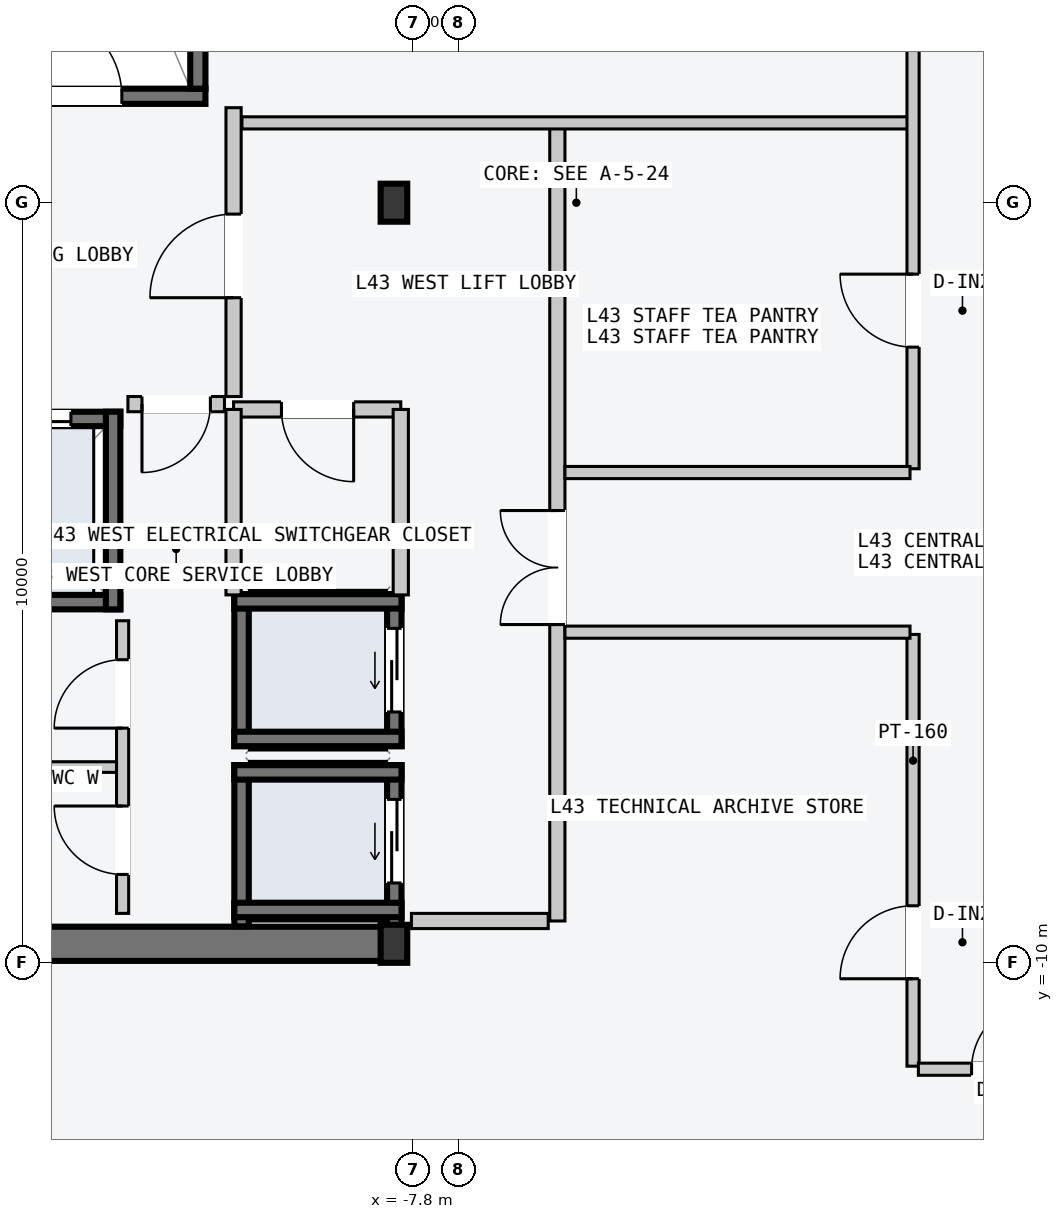
"""IFC4 building model, lengths in metres.
Left out: names, types, materials, properties, quantities, classifications, styles, units other than length and angle.
Written with IfcOpenShell. Run it as: python <this file> out.ifc"""

import sys

from ifc_helpers import new_model, si_unit, direction, frame, frame_2d, origin, origin_2d, place, context, subcontext, project, spatial, rectangle, i_section, extrude, element, fill, save


model = new_model("IFC4")
c1 = context("Model", 3, precision=1e-05, world=origin(), true_north=direction((0.0, 1.0)))
c2 = subcontext(c1, "Body", "Model", "MODEL_VIEW")
j1 = project(units=[si_unit("LENGTHUNIT", "METRE"), si_unit("PLANEANGLEUNIT", "RADIAN")], contexts=[c1])
p1 = place(None, origin())
s1 = spatial("IfcSite", under=j1, at=p1, CompositionType="ELEMENT")
p2 = place(p1, origin())
s2 = spatial("IfcBuilding", under=s1, at=p2, CompositionType="ELEMENT")
p3 = place(p2, frame((0.0, 0.0, 165.9)))
s3 = spatial("IfcBuildingStorey", under=s2, at=p3, CompositionType="ELEMENT", Elevation=165.9)
p4 = place(p3, frame((-14.53, -9.75, -0.2), z_axis=(0.0, 0.0, 1.0), x_axis=(1.0, 0.0, 0.0)))
e1 = element("IfcWall", 1, at=p4, inside=s3, PredefinedType="SHEAR", context=c2, shape_type="SweptSolid", body=[
    extrude(rectangle(XDim=6.46, YDim=0.45, at=frame_2d((3.23, 0.0))), origin(), (0.0, 0.0, 1.0), 3.6),
])
p5 = place(p3, frame((-14.25, 1.4, -0.2), z_axis=(0.0, 0.0, 1.0), x_axis=(1.0, 0.0, 0.0)))
e2 = element("IfcWall", 2, at=p5, inside=s3, PredefinedType="SOLIDWALL", context=c2, shape_type="SweptSolid", body=[
    extrude(rectangle(XDim=3.72, YDim=0.2, at=frame_2d((1.86, 0.0))), origin(), (0.0, 0.0, 1.0), 3.6),
])
p6 = place(p5, frame((1.5, 0.0, 0.2)))
e3 = element("IfcOpeningElement", 3, at=p6, cuts=e2, PredefinedType="OPENING", context=c2, shape_type="SweptSolid", body=[
    extrude(rectangle(XDim=1.12, YDim=2.18, at=frame_2d((0.56, 1.09))), frame((0.0, 0.11, 0.0), z_axis=(0.0, -1.0, 0.0), x_axis=(1.0, 0.0, 0.0)), (0.0, 0.0, 1.0), 0.22),
])
p7 = place(p3, frame((-10.63, 1.5, -0.2), z_axis=(0.0, 0.0, 1.0), x_axis=(0.0, 1.0, 0.0)))
e4 = element("IfcWall", 4, at=p7, inside=s3, PredefinedType="SOLIDWALL", context=c2, shape_type="SweptSolid", body=[
    extrude(rectangle(XDim=7.8, YDim=0.2, at=frame_2d((3.9, 0.0))), origin(), (0.0, 0.0, 1.0), 3.6),
])
for number, where, z_axis, x_axis in (
    (5, (-8.05, -9.75, 0.0), (0.0, 0.0, 1.0), (1.0, 0.0, 0.0)),
    (6, (-8.05, 0.0, 0.0), (0.0, 0.0, 1.0), (1.0, 0.0, 0.0)),
):
    element("IfcColumn", number, at=place(p3, frame(where, z_axis=z_axis, x_axis=x_axis)), inside=s3, PredefinedType="COLUMN", context=c2, shape_type="SweptSolid", body=[
        extrude(i_section(OverallWidth=0.35, OverallDepth=0.5, WebThickness=0.02, FlangeThickness=0.032, at=origin_2d()), origin(), (0.0, 0.0, 1.0), 3.6),
    ])
p8 = place(p3, frame((-8.045, -9.52, -0.2), z_axis=(0.0, 0.0, 1.0), x_axis=(0.0, 1.0, 0.0)))
e7 = element("IfcWall", 7, at=p8, inside=s3, PredefinedType="SOLIDWALL", context=c2, shape_type="SweptSolid", body=[
    extrude(rectangle(XDim=2.12, YDim=0.19, at=frame_2d((1.06, 0.0))), origin(), (0.0, 0.0, 1.0), 3.6),
])
p9 = place(p8, frame((0.57, 0.0, 0.2)))
e8 = element("IfcOpeningElement", 8, at=p9, cuts=e7, PredefinedType="OPENING", context=c2, shape_type="SweptSolid", body=[
    extrude(rectangle(XDim=1.1, YDim=2.2, at=frame_2d((0.55, 1.1))), frame((0.0, 0.105, 0.0), z_axis=(0.0, -1.0, 0.0), x_axis=(1.0, 0.0, 0.0)), (0.0, 0.0, 1.0), 0.21),
])
p10 = place(p3, frame((-10.055, -9.52, -0.2), z_axis=(0.0, 0.0, 1.0), x_axis=(0.0, 1.0, 0.0)))
e9 = element("IfcWall", 9, at=p10, inside=s3, PredefinedType="SOLIDWALL", context=c2, shape_type="SweptSolid", body=[
    extrude(rectangle(XDim=2.12, YDim=0.19, at=frame_2d((1.06, 0.0))), origin(), (0.0, 0.0, 1.0), 3.6),
])
for number, where, z_axis, x_axis in (
    (10, (-10.15, -7.495, -0.2), (0.0, 0.0, 1.0), (1.0, 0.0, 0.0)),
    (11, (-10.15, -9.305, -0.2), (0.0, 0.0, 1.0), (1.0, 0.0, 0.0)),
):
    element("IfcWall", number, at=place(p3, frame(where, z_axis=z_axis, x_axis=x_axis)), inside=s3, PredefinedType="SOLIDWALL", context=c2, shape_type="SweptSolid", body=[
        extrude(rectangle(XDim=2.2, YDim=0.19, at=frame_2d((1.1, 0.0))), origin(), (0.0, 0.0, 1.0), 3.6),
    ])
p11 = place(p3, frame((-8.045, -7.15, -0.2), z_axis=(0.0, 0.0, 1.0), x_axis=(0.0, 1.0, 0.0)))
e12 = element("IfcWall", 12, at=p11, inside=s3, PredefinedType="SOLIDWALL", context=c2, shape_type="SweptSolid", body=[
    extrude(rectangle(XDim=2.0, YDim=0.19, at=frame_2d((1.0, 0.0))), origin(), (0.0, 0.0, 1.0), 3.6),
])
p12 = place(p11, frame((0.45, 0.0, 0.2)))
e13 = element("IfcOpeningElement", 13, at=p12, cuts=e12, PredefinedType="OPENING", context=c2, shape_type="SweptSolid", body=[
    extrude(rectangle(XDim=1.1, YDim=2.2, at=frame_2d((0.55, 1.1))), frame((0.0, 0.105, 0.0), z_axis=(0.0, -1.0, 0.0), x_axis=(1.0, 0.0, 0.0)), (0.0, 0.0, 1.0), 0.21),
])
p13 = place(p3, frame((-10.055, -7.15, -0.2), z_axis=(0.0, 0.0, 1.0), x_axis=(0.0, 1.0, 0.0)))
e14 = element("IfcWall", 14, at=p13, inside=s3, PredefinedType="SOLIDWALL", context=c2, shape_type="SweptSolid", body=[
    extrude(rectangle(XDim=2.0, YDim=0.19, at=frame_2d((1.0, 0.0))), origin(), (0.0, 0.0, 1.0), 3.6),
])
for number, where, z_axis, x_axis in (
    (15, (-10.15, -5.245, -0.2), (0.0, 0.0, 1.0), (1.0, 0.0, 0.0)),
    (16, (-10.15, -7.055, -0.2), (0.0, 0.0, 1.0), (1.0, 0.0, 0.0)),
):
    element("IfcWall", number, at=place(p3, frame(where, z_axis=z_axis, x_axis=x_axis)), inside=s3, PredefinedType="SOLIDWALL", context=c2, shape_type="SweptSolid", body=[
        extrude(rectangle(XDim=2.2, YDim=0.19, at=frame_2d((1.1, 0.0))), origin(), (0.0, 0.0, 1.0), 3.6),
    ])
p14 = place(p3, frame((-14.33, -2.845, -0.2), z_axis=(0.0, 0.0, 1.0), x_axis=(1.0, 0.0, 0.0)))
e17 = element("IfcWall", 17, at=p14, inside=s3, PredefinedType="SOLIDWALL", context=c2, shape_type="SweptSolid", body=[
    extrude(rectangle(XDim=2.68, YDim=0.19, at=frame_2d((1.34, 0.0))), origin(), (0.0, 0.0, 1.0), 3.6),
])
p15 = place(p14, frame((0.83, 0.0, 0.2)))
e18 = element("IfcOpeningElement", 18, at=p15, cuts=e17, PredefinedType="OPENING", context=c2, shape_type="SweptSolid", body=[
    extrude(rectangle(XDim=1.2, YDim=2.2, at=frame_2d((0.6, 1.1))), frame((0.0, 0.105, 0.0), z_axis=(0.0, -1.0, 0.0), x_axis=(1.0, 0.0, 0.0)), (0.0, 0.0, 1.0), 0.21),
])
p16 = place(p3, frame((-14.33, -5.255, -0.2), z_axis=(0.0, 0.0, 1.0), x_axis=(1.0, 0.0, 0.0)))
e19 = element("IfcWall", 19, at=p16, inside=s3, PredefinedType="SOLIDWALL", context=c2, shape_type="SweptSolid", body=[
    extrude(rectangle(XDim=2.68, YDim=0.19, at=frame_2d((1.34, 0.0))), origin(), (0.0, 0.0, 1.0), 3.6),
])
p17 = place(p3, frame((-11.745, -5.35, -0.2), z_axis=(0.0, 0.0, 1.0), x_axis=(0.0, 1.0, 0.0)))
e20 = element("IfcWall", 20, at=p17, inside=s3, PredefinedType="SOLIDWALL", context=c2, shape_type="SweptSolid", body=[
    extrude(rectangle(XDim=2.6, YDim=0.19, at=frame_2d((1.3, 0.0))), origin(), (0.0, 0.0, 1.0), 3.6),
])
p18 = place(p3, frame((-5.9, -9.45, 0.0), z_axis=(0.0, 0.0, 1.0), x_axis=(0.0, 1.0, 0.0)))
e21 = element("IfcWall", 21, at=p18, inside=s3, PredefinedType="PARTITIONING", context=c2, shape_type="SweptSolid", body=[
    extrude(rectangle(XDim=10.5, YDim=0.2, at=frame_2d((5.25, 0.0))), origin(), (0.0, 0.0, 1.0), 3.4),
])
p19 = place(p18, frame((3.9, 0.0, 0.0)))
e22 = element("IfcOpeningElement", 22, at=p19, cuts=e21, PredefinedType="OPENING", context=c2, shape_type="SweptSolid", body=[
    extrude(rectangle(XDim=1.5, YDim=2.2, at=frame_2d((0.75, 1.1))), frame((0.0, 0.11, 0.0), z_axis=(0.0, -1.0, 0.0), x_axis=(1.0, 0.0, 0.0)), (0.0, 0.0, 1.0), 0.22),
])
p20 = place(p3, frame((-6.02, -9.45, 0.0), z_axis=(0.0, 0.0, 1.0), x_axis=(-1.0, 0.0, 0.0)))
e23 = element("IfcWall", 23, at=p20, inside=s3, PredefinedType="PARTITIONING", context=c2, shape_type="SweptSolid", body=[
    extrude(rectangle(XDim=1.8, YDim=0.2, at=frame_2d((0.9, 0.0))), origin(), (0.0, 0.0, 1.0), 3.4),
])
p21 = place(p3, frame((-10.16, -2.55, 0.0), z_axis=(0.0, 0.0, 1.0), x_axis=(0.0, 1.0, 0.0)))
e24 = element("IfcWall", 24, at=p21, inside=s3, PredefinedType="PARTITIONING", context=c2, shape_type="SweptSolid", body=[
    extrude(rectangle(XDim=3.8, YDim=0.2, at=frame_2d((1.9, 0.0))), origin(), (0.0, 0.0, 1.0), 3.4),
])
p22 = place(p21, frame((1.3, 0.0, 0.0)))
e25 = element("IfcOpeningElement", 25, at=p22, cuts=e24, PredefinedType="OPENING", context=c2, shape_type="SweptSolid", body=[
    extrude(rectangle(XDim=1.1, YDim=2.15, at=frame_2d((0.55, 1.075))), frame((0.0, 0.11, 0.0), z_axis=(0.0, -1.0, 0.0), x_axis=(1.0, 0.0, 0.0)), (0.0, 0.0, 1.0), 0.22),
])
p23 = place(p3, frame((-10.28, -2.65, 0.0), z_axis=(0.0, 0.0, 1.0), x_axis=(-1.0, 0.0, 0.0)))
e26 = element("IfcWall", 26, at=p23, inside=s3, PredefinedType="PARTITIONING", context=c2, shape_type="SweptSolid", body=[
    extrude(rectangle(XDim=1.27, YDim=0.2, at=frame_2d((0.635, 0.0))), origin(), (0.0, 0.0, 1.0), 3.4),
])
p24 = place(p23, frame((0.185, 0.0, 0.0)))
e27 = element("IfcOpeningElement", 27, at=p24, cuts=e26, PredefinedType="OPENING", context=c2, shape_type="SweptSolid", body=[
    extrude(rectangle(XDim=0.9, YDim=2.15, at=frame_2d((0.45, 1.075))), frame((0.0, 0.11, 0.0), z_axis=(0.0, -1.0, 0.0), x_axis=(1.0, 0.0, 0.0)), (0.0, 0.0, 1.0), 0.22),
])
p25 = place(p3, frame((-7.96, -2.72, 0.0), z_axis=(0.0, 0.0, 1.0), x_axis=(-1.0, 0.0, 0.0)))
e28 = element("IfcWall", 28, at=p25, inside=s3, PredefinedType="PARTITIONING", context=c2, shape_type="SweptSolid", body=[
    extrude(rectangle(XDim=2.2, YDim=0.2, at=frame_2d((1.1, 0.0))), origin(), (0.0, 0.0, 1.0), 3.4),
])
p26 = place(p25, frame((0.62, 0.0, 0.0)))
e29 = element("IfcOpeningElement", 29, at=p26, cuts=e28, PredefinedType="OPENING", context=c2, shape_type="SweptSolid", body=[
    extrude(rectangle(XDim=0.95, YDim=2.1, at=frame_2d((0.475, 1.05))), frame((0.0, 0.11, 0.0), z_axis=(0.0, -1.0, 0.0), x_axis=(1.0, 0.0, 0.0)), (0.0, 0.0, 1.0), 0.22),
])
for number, where, z_axis, x_axis in (
    (30, (-7.96, -5.16, 0.0), (0.0, 0.0, 1.0), (0.0, 1.0, 0.0)),
    (31, (-10.16, -5.16, 0.0), (0.0, 0.0, 1.0), (0.0, 1.0, 0.0)),
):
    element("IfcWall", number, at=place(p3, frame(where, z_axis=z_axis, x_axis=x_axis)), inside=s3, PredefinedType="PARTITIONING", context=c2, shape_type="SweptSolid", body=[
        extrude(rectangle(XDim=2.44, YDim=0.2, at=frame_2d((1.22, 0.0))), origin(), (0.0, 0.0, 1.0), 3.4),
    ])
p27 = place(p3, frame((-11.7, -7.425, 0.0), z_axis=(0.0, 0.0, 1.0), x_axis=(-1.0, 0.0, 0.0)))
e32 = element("IfcWall", 32, at=p27, inside=s3, PredefinedType="PARTITIONING", context=c2, shape_type="SweptSolid", body=[
    extrude(rectangle(XDim=2.5, YDim=0.14, at=frame_2d((1.25, 0.0))), origin(), (0.0, 0.0, 1.0), 3.4),
])
p28 = place(p3, frame((-11.62, -9.35, 0.0), z_axis=(0.0, 0.0, 1.0), x_axis=(0.0, 1.0, 0.0)))
e33 = element("IfcWall", 33, at=p28, inside=s3, PredefinedType="PARTITIONING", context=c2, shape_type="SweptSolid", body=[
    extrude(rectangle(XDim=3.85, YDim=0.16, at=frame_2d((1.925, 0.0))), origin(), (0.0, 0.0, 1.0), 3.4),
])
p29 = place(p28, frame((0.512, 0.0, 0.0)))
e34 = element("IfcOpeningElement", 34, at=p29, cuts=e33, PredefinedType="OPENING", context=c2, shape_type="SweptSolid", body=[
    extrude(rectangle(XDim=0.9, YDim=2.15, at=frame_2d((0.45, 1.075))), frame((0.0, 0.09, 0.0), z_axis=(0.0, -1.0, 0.0), x_axis=(1.0, 0.0, 0.0)), (0.0, 0.0, 1.0), 0.18),
])
p30 = place(p28, frame((2.438, 0.0, 0.0)))
e35 = element("IfcOpeningElement", 35, at=p30, cuts=e33, PredefinedType="OPENING", context=c2, shape_type="SweptSolid", body=[
    extrude(rectangle(XDim=0.9, YDim=2.15, at=frame_2d((0.45, 1.075))), frame((0.0, 0.09, 0.0), z_axis=(0.0, -1.0, 0.0), x_axis=(1.0, 0.0, 0.0)), (0.0, 0.0, 1.0), 0.18),
])
p31 = place(p3, frame((-10.05, 1.05, 0.0), z_axis=(0.0, 0.0, 1.0), x_axis=(1.0, 0.0, 0.0)))
e36 = element("IfcWall", 36, at=p31, inside=s3, PredefinedType="PARTITIONING", context=c2, shape_type="SweptSolid", body=[
    extrude(rectangle(XDim=8.79, YDim=0.16, at=frame_2d((4.395, 0.0))), origin(), (0.0, 0.0, 1.0), 3.4),
])
p32 = place(p3, frame((-1.22, -3.5, 0.0), z_axis=(0.0, 0.0, 1.0), x_axis=(0.0, 1.0, 0.0)))
e37 = element("IfcWall", 37, at=p32, inside=s3, PredefinedType="PARTITIONING", context=c2, shape_type="SweptSolid", body=[
    extrude(rectangle(XDim=14.86, YDim=0.16, at=frame_2d((7.43, 0.0))), origin(), (0.0, 0.0, 1.0), 3.4),
])
p33 = place(p32, frame((6.1, 0.0, 0.0)))
e38 = element("IfcOpeningElement", 38, at=p33, cuts=e37, PredefinedType="OPENING", context=c2, shape_type="SweptSolid", body=[
    extrude(rectangle(XDim=1.24, YDim=2.24, at=frame_2d((0.62, 1.12))), frame((0.0, 0.09, 0.0), z_axis=(0.0, -1.0, 0.0), x_axis=(1.0, 0.0, 0.0)), (0.0, 0.0, 1.0), 0.18),
])
p34 = place(p32, frame((1.6, 0.0, 0.0)))
e39 = element("IfcOpeningElement", 39, at=p34, cuts=e37, PredefinedType="OPENING", context=c2, shape_type="SweptSolid", body=[
    extrude(rectangle(XDim=0.96, YDim=2.18, at=frame_2d((0.48, 1.09))), frame((0.0, 0.09, 0.0), z_axis=(0.0, -1.0, 0.0), x_axis=(1.0, 0.0, 0.0)), (0.0, 0.0, 1.0), 0.18),
])
p35 = place(p3, frame((-5.8, -3.55, 0.0), z_axis=(0.0, 0.0, 1.0), x_axis=(1.0, 0.0, 0.0)))
e40 = element("IfcWall", 40, at=p35, inside=s3, PredefinedType="PARTITIONING", context=c2, shape_type="SweptSolid", body=[
    extrude(rectangle(XDim=4.54, YDim=0.16, at=frame_2d((2.27, 0.0))), origin(), (0.0, 0.0, 1.0), 3.4),
])
p36 = place(p3, frame((-1.22, -11.36, 0.0), z_axis=(0.0, 0.0, 1.0), x_axis=(0.0, 1.0, 0.0)))
e41 = element("IfcWall", 41, at=p36, inside=s3, PredefinedType="PARTITIONING", context=c2, shape_type="SweptSolid", body=[
    extrude(rectangle(XDim=5.68, YDim=0.16, at=frame_2d((2.84, 0.0))), origin(), (0.0, 0.0, 1.0), 3.4),
])
p37 = place(p36, frame((1.15, 0.0, 0.0)))
e42 = element("IfcOpeningElement", 42, at=p37, cuts=e41, PredefinedType="OPENING", context=c2, shape_type="SweptSolid", body=[
    extrude(rectangle(XDim=0.96, YDim=2.18, at=frame_2d((0.48, 1.09))), frame((0.0, 0.09, 0.0), z_axis=(0.0, -1.0, 0.0), x_axis=(1.0, 0.0, 0.0)), (0.0, 0.0, 1.0), 0.18),
])
p38 = place(p3, frame((-5.8, -5.65, 0.0), z_axis=(0.0, 0.0, 1.0), x_axis=(1.0, 0.0, 0.0)))
e43 = element("IfcWall", 43, at=p38, inside=s3, PredefinedType="PARTITIONING", context=c2, shape_type="SweptSolid", body=[
    extrude(rectangle(XDim=4.54, YDim=0.16, at=frame_2d((2.27, 0.0))), origin(), (0.0, 0.0, 1.0), 3.4),
])
p39 = place(p3, frame((-1.15, -11.4, 0.0), z_axis=(0.0, 0.0, 1.0), x_axis=(1.0, 0.0, 0.0)))
e44 = element("IfcWall", 44, at=p39, inside=s3, PredefinedType="PARTITIONING", context=c2, shape_type="SweptSolid", body=[
    extrude(rectangle(XDim=2.3, YDim=0.16, at=frame_2d((1.15, 0.0))), origin(), (0.0, 0.0, 1.0), 3.4),
])
p40 = place(p39, frame((0.7, 0.0, 0.0)))
e45 = element("IfcOpeningElement", 45, at=p40, cuts=e44, PredefinedType="OPENING", context=c2, shape_type="SweptSolid", body=[
    extrude(rectangle(XDim=0.9, YDim=2.15, at=frame_2d((0.45, 1.075))), frame((0.0, 0.09, 0.0), z_axis=(0.0, -1.0, 0.0), x_axis=(1.0, 0.0, 0.0)), (0.0, 0.0, 1.0), 0.18),
])
p41 = place(p6, origin())
e46 = element("IfcDoor", 46, at=p41, inside=s3, OperationType="SINGLE_SWING_LEFT", PredefinedType="DOOR", context=c2, shape_type="SweptSolid", body=[
    extrude(rectangle(XDim=1.12, YDim=2.18, at=frame_2d((0.56, 1.09))), frame((0.0, 0.025, 0.0), z_axis=(0.0, -1.0, 0.0), x_axis=(1.0, 0.0, 0.0)), (0.0, 0.0, 1.0), 0.05),
])
fill(e3, e46)
p42 = place(p9, origin())
e47 = element("IfcDoor", 47, at=p42, inside=s3, OperationType="SLIDING_TO_LEFT", PredefinedType="DOOR", context=c2, shape_type="SweptSolid", body=[
    extrude(rectangle(XDim=1.1, YDim=2.2, at=frame_2d((0.55, 1.1))), frame((0.0, 0.025, 0.0), z_axis=(0.0, -1.0, 0.0), x_axis=(1.0, 0.0, 0.0)), (0.0, 0.0, 1.0), 0.05),
])
fill(e8, e47)
p43 = place(p12, origin())
e48 = element("IfcDoor", 48, at=p43, inside=s3, OperationType="SLIDING_TO_LEFT", PredefinedType="DOOR", context=c2, shape_type="SweptSolid", body=[
    extrude(rectangle(XDim=1.1, YDim=2.2, at=frame_2d((0.55, 1.1))), frame((0.0, 0.025, 0.0), z_axis=(0.0, -1.0, 0.0), x_axis=(1.0, 0.0, 0.0)), (0.0, 0.0, 1.0), 0.05),
])
fill(e13, e48)
p44 = place(p15, origin())
e49 = element("IfcDoor", 49, at=p44, inside=s3, OperationType="SLIDING_TO_LEFT", PredefinedType="DOOR", context=c2, shape_type="SweptSolid", body=[
    extrude(rectangle(XDim=1.2, YDim=2.2, at=frame_2d((0.6, 1.1))), frame((0.0, 0.025, 0.0), z_axis=(0.0, -1.0, 0.0), x_axis=(1.0, 0.0, 0.0)), (0.0, 0.0, 1.0), 0.05),
])
fill(e18, e49)
p45 = place(p19, origin())
e50 = element("IfcDoor", 50, at=p45, inside=s3, OperationType="DOUBLE_DOOR_SINGLE_SWING", PredefinedType="DOOR", context=c2, shape_type="SweptSolid", body=[
    extrude(rectangle(XDim=1.5, YDim=2.2, at=frame_2d((0.75, 1.1))), frame((0.0, 0.025, 0.0), z_axis=(0.0, -1.0, 0.0), x_axis=(1.0, 0.0, 0.0)), (0.0, 0.0, 1.0), 0.05),
])
fill(e22, e50)
p46 = place(p22, origin())
e51 = element("IfcDoor", 51, at=p46, inside=s3, OperationType="SINGLE_SWING_LEFT", PredefinedType="DOOR", context=c2, shape_type="SweptSolid", body=[
    extrude(rectangle(XDim=1.1, YDim=2.15, at=frame_2d((0.55, 1.075))), frame((0.0, 0.025, 0.0), z_axis=(0.0, -1.0, 0.0), x_axis=(1.0, 0.0, 0.0)), (0.0, 0.0, 1.0), 0.05),
])
fill(e25, e51)
p47 = place(p24, origin())
e52 = element("IfcDoor", 52, at=p47, inside=s3, OperationType="SINGLE_SWING_RIGHT", PredefinedType="DOOR", context=c2, shape_type="SweptSolid", body=[
    extrude(rectangle(XDim=0.9, YDim=2.15, at=frame_2d((0.45, 1.075))), frame((0.0, 0.025, 0.0), z_axis=(0.0, -1.0, 0.0), x_axis=(1.0, 0.0, 0.0)), (0.0, 0.0, 1.0), 0.05),
])
fill(e27, e52)
p48 = place(p26, origin())
e53 = element("IfcDoor", 53, at=p48, inside=s3, OperationType="SINGLE_SWING_LEFT", PredefinedType="DOOR", context=c2, shape_type="SweptSolid", body=[
    extrude(rectangle(XDim=0.95, YDim=2.1, at=frame_2d((0.475, 1.05))), frame((0.0, 0.025, 0.0), z_axis=(0.0, -1.0, 0.0), x_axis=(1.0, 0.0, 0.0)), (0.0, 0.0, 1.0), 0.05),
])
fill(e29, e53)
p49 = place(p29, origin())
e54 = element("IfcDoor", 54, at=p49, inside=s3, OperationType="SINGLE_SWING_RIGHT", PredefinedType="DOOR", context=c2, shape_type="SweptSolid", body=[
    extrude(rectangle(XDim=0.9, YDim=2.15, at=frame_2d((0.45, 1.075))), frame((0.0, 0.025, 0.0), z_axis=(0.0, -1.0, 0.0), x_axis=(1.0, 0.0, 0.0)), (0.0, 0.0, 1.0), 0.05),
])
fill(e34, e54)
p50 = place(p30, origin())
e55 = element("IfcDoor", 55, at=p50, inside=s3, OperationType="SINGLE_SWING_LEFT", PredefinedType="DOOR", context=c2, shape_type="SweptSolid", body=[
    extrude(rectangle(XDim=0.9, YDim=2.15, at=frame_2d((0.45, 1.075))), frame((0.0, 0.025, 0.0), z_axis=(0.0, -1.0, 0.0), x_axis=(1.0, 0.0, 0.0)), (0.0, 0.0, 1.0), 0.05),
])
fill(e35, e55)
p51 = place(p34, origin())
e56 = element("IfcDoor", 56, at=p51, inside=s3, OperationType="SINGLE_SWING_RIGHT", PredefinedType="DOOR", context=c2, shape_type="SweptSolid", body=[
    extrude(rectangle(XDim=0.96, YDim=2.18, at=frame_2d((0.48, 1.09))), frame((0.0, 0.025, 0.0), z_axis=(0.0, -1.0, 0.0), x_axis=(1.0, 0.0, 0.0)), (0.0, 0.0, 1.0), 0.05),
])
fill(e39, e56)
p52 = place(p37, origin())
e57 = element("IfcDoor", 57, at=p52, inside=s3, OperationType="SINGLE_SWING_LEFT", PredefinedType="DOOR", context=c2, shape_type="SweptSolid", body=[
    extrude(rectangle(XDim=0.96, YDim=2.18, at=frame_2d((0.48, 1.09))), frame((0.0, 0.025, 0.0), z_axis=(0.0, -1.0, 0.0), x_axis=(1.0, 0.0, 0.0)), (0.0, 0.0, 1.0), 0.05),
])
fill(e42, e57)
p53 = place(p40, origin())
e58 = element("IfcDoor", 58, at=p53, inside=s3, OperationType="SINGLE_SWING_RIGHT", PredefinedType="DOOR", context=c2, shape_type="SweptSolid", body=[
    extrude(rectangle(XDim=0.9, YDim=2.15, at=frame_2d((0.45, 1.075))), frame((0.0, 0.025, 0.0), z_axis=(0.0, -1.0, 0.0), x_axis=(1.0, 0.0, 0.0)), (0.0, 0.0, 1.0), 0.05),
])
fill(e45, e58)
save(model, sys.argv[1])
